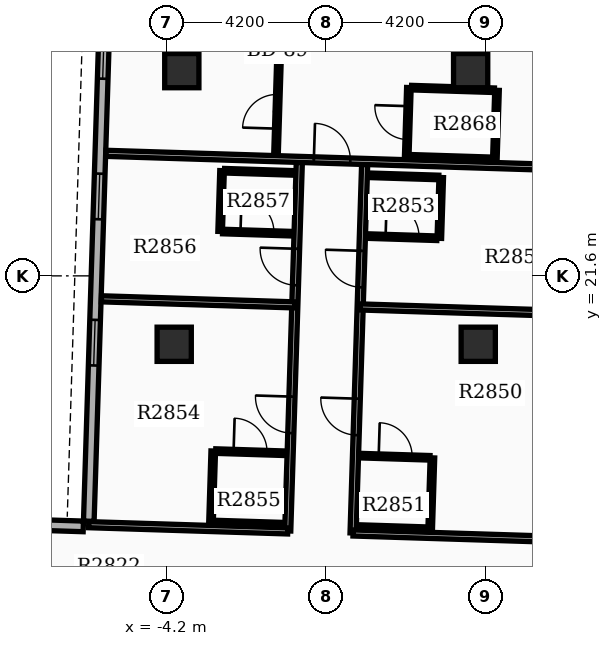
"""IFC4 building model, lengths in metres.
Left out: names, types, materials, properties, quantities, classifications, styles, units other than length and angle.
Written with IfcOpenShell. Run it as: python <this file> out.ifc"""

import sys

from ifc_helpers import new_model, si_unit, direction, frame, frame_2d, origin, origin_2d, place, context, subcontext, project, spatial, rectangle, extrude, element, fill, save


model = new_model("IFC4")
c1 = context("Model", 3, precision=1e-05, world=origin(), true_north=direction((0.0, 1.0)))
c2 = subcontext(c1, "Body", "Model", "MODEL_VIEW")
j1 = project(units=[si_unit("LENGTHUNIT", "METRE"), si_unit("PLANEANGLEUNIT", "RADIAN")], contexts=[c1])
p1 = place(None, origin())
s1 = spatial("IfcSite", under=j1, at=p1, CompositionType="ELEMENT")
p2 = place(p1, origin())
s2 = spatial("IfcBuilding", under=s1, at=p2, CompositionType="ELEMENT")
p3 = place(p2, frame((0.0, 0.0, 176.1)))
s3 = spatial("IfcBuildingStorey", under=s2, at=p3, CompositionType="ELEMENT", Elevation=176.1)
for number, where, z_axis, x_axis in (
    (1, (-4.0, 19.8, 0.0), (0.0, 0.0, 1.0), (1.0, 0.0, 0.0)),
    (2, (4.0, 19.8, 0.0), (0.0, 0.0, 1.0), (1.0, 0.0, 0.0)),
    (3, (-3.8, 27.0, 0.0), (0.0, 0.0, 1.0), (1.0, 0.0, 0.0)),
    (4, (3.8, 27.0, 0.0), (0.0, 0.0, 1.0), (1.0, 0.0, 0.0)),
):
    element("IfcColumn", number, at=place(p3, frame(where, z_axis=z_axis, x_axis=x_axis)), inside=s3, PredefinedType="COLUMN", context=c2, shape_type="SweptSolid", body=[
        extrude(rectangle(XDim=0.9, YDim=0.9, at=origin_2d()), origin(), (0.0, 0.0, 1.0), 3.9),
    ])
p4 = place(p3, frame((-5.616, 35.234, 0.0), z_axis=(0.0, 0.0, 1.0), x_axis=(-0.031398187845, -0.999506955354, 0.0)))
e5 = element("IfcWall", 5, at=p4, inside=s3, PredefinedType="STANDARD", context=c2, shape_type="SweptSolid", body=[
    extrude(rectangle(XDim=20.1, YDim=0.28, at=frame_2d((10.05, 0.0))), origin(), (0.0, 0.0, 1.0), 2.97),
])
p5 = place(p4, frame((0.85, 0.0, 0.8)))
e6 = element("IfcOpeningElement", 6, at=p5, cuts=e5, PredefinedType="OPENING", context=c2, shape_type="SweptSolid", body=[
    extrude(rectangle(XDim=1.2, YDim=1.6, at=frame_2d((0.6, 0.8))), frame((0.0, 0.15, 0.0), z_axis=(0.0, -1.0, 0.0), x_axis=(1.0, 0.0, 0.0)), (0.0, 0.0, 1.0), 0.3),
])
p6 = place(p4, frame((4.05, 0.0, 0.8)))
e7 = element("IfcOpeningElement", 7, at=p6, cuts=e5, PredefinedType="OPENING", context=c2, shape_type="SweptSolid", body=[
    extrude(rectangle(XDim=1.2, YDim=1.6, at=frame_2d((0.6, 0.8))), frame((0.0, 0.15, 0.0), z_axis=(0.0, -1.0, 0.0), x_axis=(1.0, 0.0, 0.0)), (0.0, 0.0, 1.0), 0.3),
])
p7 = place(p4, frame((7.25, 0.0, 0.8)))
e8 = element("IfcOpeningElement", 8, at=p7, cuts=e5, PredefinedType="OPENING", context=c2, shape_type="SweptSolid", body=[
    extrude(rectangle(XDim=1.2, YDim=1.6, at=frame_2d((0.6, 0.8))), frame((0.0, 0.15, 0.0), z_axis=(0.0, -1.0, 0.0), x_axis=(1.0, 0.0, 0.0)), (0.0, 0.0, 1.0), 0.3),
])
p8 = place(p4, frame((10.95, 0.0, 0.8)))
e9 = element("IfcOpeningElement", 9, at=p8, cuts=e5, PredefinedType="OPENING", context=c2, shape_type="SweptSolid", body=[
    extrude(rectangle(XDim=1.2, YDim=1.6, at=frame_2d((0.6, 0.8))), frame((0.0, 0.15, 0.0), z_axis=(0.0, -1.0, 0.0), x_axis=(1.0, 0.0, 0.0)), (0.0, 0.0, 1.0), 0.3),
])
p9 = place(p4, frame((14.799, 0.0, 0.85)))
e10 = element("IfcOpeningElement", 10, at=p9, cuts=e5, PredefinedType="OPENING", context=c2, shape_type="SweptSolid", body=[
    extrude(rectangle(XDim=1.2, YDim=1.6, at=frame_2d((0.6, 0.8))), frame((0.0, 0.15, 0.0), z_axis=(0.0, -1.0, 0.0), x_axis=(1.0, 0.0, 0.0)), (0.0, 0.0, 1.0), 0.3),
])
p10 = place(p3, frame((-12.689, 15.206, 0.0), z_axis=(0.0, 0.0, 1.0), x_axis=(0.999507262922, -0.031388395416, 0.0)))
e11 = element("IfcWall", 11, at=p10, inside=s3, PredefinedType="STANDARD", context=c2, shape_type="SweptSolid", body=[
    extrude(rectangle(XDim=6.3, YDim=0.28, at=frame_2d((3.15, 0.0))), origin(), (0.0, 0.0, 1.0), 2.97),
])
p11 = place(p3, frame((0.706, 14.835, 0.0), z_axis=(0.0, 0.0, 1.0), x_axis=(0.031411552371, 0.999506535435, 0.0)))
e12 = element("IfcWall", 12, at=p11, inside=s3, PredefinedType="PARTITIONING", context=c2, shape_type="SweptSolid", body=[
    extrude(rectangle(XDim=9.7, YDim=0.16, at=frame_2d((4.85, 0.0))), origin(), (0.0, 0.0, 1.0), 2.96),
])
p12 = place(p11, frame((2.575, 0.0, 0.0)))
e13 = element("IfcOpeningElement", 13, at=p12, cuts=e12, PredefinedType="OPENING", context=c2, shape_type="SweptSolid", body=[
    extrude(rectangle(XDim=0.96, YDim=2.15, at=frame_2d((0.48, 1.075))), frame((0.0, 0.09, 0.0), z_axis=(0.0, -1.0, 0.0), x_axis=(1.0, 0.0, 0.0)), (0.0, 0.0, 1.0), 0.18),
])
p13 = place(p11, frame((6.467, 0.0, 0.0)))
e14 = element("IfcOpeningElement", 14, at=p13, cuts=e12, PredefinedType="OPENING", context=c2, shape_type="SweptSolid", body=[
    extrude(rectangle(XDim=0.96, YDim=2.15, at=frame_2d((0.48, 1.075))), frame((0.0, 0.09, 0.0), z_axis=(0.0, -1.0, 0.0), x_axis=(1.0, 0.0, 0.0)), (0.0, 0.0, 1.0), 0.18),
])
p14 = place(p3, frame((0.706, 14.835, 0.0), z_axis=(0.0, 0.0, 1.0), x_axis=(0.999506214218, -0.031421771746, 0.0)))
e15 = element("IfcWall", 15, at=p14, inside=s3, PredefinedType="PARTITIONING", context=c2, shape_type="SweptSolid", body=[
    extrude(rectangle(XDim=6.48, YDim=0.16, at=frame_2d((3.24, 0.0))), origin(), (0.0, 0.0, 1.0), 2.96),
])
p15 = place(p3, frame((0.893, 20.782, 0.0), z_axis=(0.0, 0.0, 1.0), x_axis=(0.999506152458, -0.031423736229, 0.0)))
e16 = element("IfcWall", 16, at=p15, inside=s3, PredefinedType="PARTITIONING", context=c2, shape_type="SweptSolid", body=[
    extrude(rectangle(XDim=6.332, YDim=0.16, at=frame_2d((3.166, 0.0))), origin(), (0.0, 0.0, 1.0), 2.96),
])
p16 = place(p3, frame((0.91, 16.87, 0.0), z_axis=(0.0, 0.0, 1.0), x_axis=(0.999507221803, -0.031389704724, 0.0)))
e17 = element("IfcWall", 17, at=p16, inside=s3, PredefinedType="PARTITIONING", context=c2, shape_type="SweptSolid", body=[
    extrude(rectangle(XDim=1.82, YDim=0.12, at=frame_2d((0.91, 0.0))), origin(), (0.0, 0.0, 1.0), 2.96),
])
p17 = place(p16, frame((0.47, 0.0, 0.0)))
e18 = element("IfcOpeningElement", 18, at=p17, cuts=e17, PredefinedType="OPENING", context=c2, shape_type="SweptSolid", body=[
    extrude(rectangle(XDim=0.88, YDim=2.1, at=frame_2d((0.44, 1.05))), frame((0.0, 0.07, 0.0), z_axis=(0.0, -1.0, 0.0), x_axis=(1.0, 0.0, 0.0)), (0.0, 0.0, 1.0), 0.14),
])
p18 = place(p3, frame((0.851, 14.991, 0.0), z_axis=(0.0, 0.0, 1.0), x_axis=(0.999507221803, -0.031389704724, 0.0)))
e19 = element("IfcWall", 19, at=p18, inside=s3, PredefinedType="PARTITIONING", context=c2, shape_type="SweptSolid", body=[
    extrude(rectangle(XDim=1.82, YDim=0.12, at=frame_2d((0.91, 0.0))), origin(), (0.0, 0.0, 1.0), 2.96),
])
p19 = place(p3, frame((2.735, 14.931, 0.0), z_axis=(0.0, 0.0, 1.0), x_axis=(0.031425292588, 0.999506103526, 0.0)))
e20 = element("IfcWall", 20, at=p19, inside=s3, PredefinedType="PARTITIONING", context=c2, shape_type="SweptSolid", body=[
    extrude(rectangle(XDim=1.88, YDim=0.12, at=frame_2d((0.94, 0.0))), origin(), (0.0, 0.0, 1.0), 2.96),
])
p20 = place(p3, frame((1.092, 22.647, 0.0), z_axis=(0.0, 0.0, 1.0), x_axis=(0.999503004171, -0.03152371574, 0.0)))
e21 = element("IfcWall", 21, at=p20, inside=s3, PredefinedType="PARTITIONING", context=c2, shape_type="SweptSolid", body=[
    extrude(rectangle(XDim=1.82, YDim=0.12, at=frame_2d((0.91, 0.0))), origin(), (0.0, 0.0, 1.0), 2.96),
])
p21 = place(p20, frame((0.47, 0.0, 0.0)))
e22 = element("IfcOpeningElement", 22, at=p21, cuts=e21, PredefinedType="OPENING", context=c2, shape_type="SweptSolid", body=[
    extrude(rectangle(XDim=0.88, YDim=2.1, at=frame_2d((0.44, 1.05))), frame((0.0, 0.07, 0.0), z_axis=(0.0, -1.0, 0.0), x_axis=(1.0, 0.0, 0.0)), (0.0, 0.0, 1.0), 0.14),
])
p22 = place(p3, frame((1.142, 24.246, 0.0), z_axis=(0.0, 0.0, 1.0), x_axis=(0.999507221803, -0.031389704724, 0.0)))
e23 = element("IfcWall", 23, at=p22, inside=s3, PredefinedType="PARTITIONING", context=c2, shape_type="SweptSolid", body=[
    extrude(rectangle(XDim=1.82, YDim=0.12, at=frame_2d((0.91, 0.0))), origin(), (0.0, 0.0, 1.0), 2.96),
])
p23 = place(p3, frame((2.976, 22.588, 0.0), z_axis=(0.0, 0.0, 1.0), x_axis=(0.031277621856, 0.999510735496, 0.0)))
e24 = element("IfcWall", 24, at=p23, inside=s3, PredefinedType="PARTITIONING", context=c2, shape_type="SweptSolid", body=[
    extrude(rectangle(XDim=1.6, YDim=0.12, at=frame_2d((0.8, 0.0))), origin(), (0.0, 0.0, 1.0), 2.96),
])
p24 = place(p3, frame((-1.013, 14.889, 0.0), z_axis=(0.0, 0.0, 1.0), x_axis=(0.031410762168, 0.999506560269, 0.0)))
e25 = element("IfcWall", 25, at=p24, inside=s3, PredefinedType="PARTITIONING", context=c2, shape_type="SweptSolid", body=[
    extrude(rectangle(XDim=9.7, YDim=0.16, at=frame_2d((4.85, 0.0))), origin(), (0.0, 0.0, 1.0), 2.96),
])
p25 = place(p24, frame((2.575, 0.0, 0.0)))
e26 = element("IfcOpeningElement", 26, at=p25, cuts=e25, PredefinedType="OPENING", context=c2, shape_type="SweptSolid", body=[
    extrude(rectangle(XDim=0.96, YDim=2.15, at=frame_2d((0.48, 1.075))), frame((0.0, 0.09, 0.0), z_axis=(0.0, -1.0, 0.0), x_axis=(1.0, 0.0, 0.0)), (0.0, 0.0, 1.0), 0.18),
])
p26 = place(p24, frame((6.467, 0.0, 0.0)))
e27 = element("IfcOpeningElement", 27, at=p26, cuts=e25, PredefinedType="OPENING", context=c2, shape_type="SweptSolid", body=[
    extrude(rectangle(XDim=0.96, YDim=2.15, at=frame_2d((0.48, 1.075))), frame((0.0, 0.09, 0.0), z_axis=(0.0, -1.0, 0.0), x_axis=(1.0, 0.0, 0.0)), (0.0, 0.0, 1.0), 0.18),
])
p27 = place(p3, frame((-1.013, 14.889, 0.0), z_axis=(0.0, 0.0, 1.0), x_axis=(-0.999506834859, 0.031402023339, 0.0)))
e28 = element("IfcWall", 28, at=p27, inside=s3, PredefinedType="PARTITIONING", context=c2, shape_type="SweptSolid", body=[
    extrude(rectangle(XDim=5.24, YDim=0.16, at=frame_2d((2.62, 0.0))), origin(), (0.0, 0.0, 1.0), 2.96),
])
p28 = place(p3, frame((-0.826, 20.836, 0.0), z_axis=(0.0, 0.0, 1.0), x_axis=(-0.999506728859, 0.031405397074, 0.0)))
e29 = element("IfcWall", 29, at=p28, inside=s3, PredefinedType="PARTITIONING", context=c2, shape_type="SweptSolid", body=[
    extrude(rectangle(XDim=5.092, YDim=0.16, at=frame_2d((2.546, 0.0))), origin(), (0.0, 0.0, 1.0), 2.96),
])
p29 = place(p3, frame((-2.908, 16.99, 0.0), z_axis=(0.0, 0.0, 1.0), x_axis=(0.999507221803, -0.031389704724, 0.0)))
e30 = element("IfcWall", 30, at=p29, inside=s3, PredefinedType="PARTITIONING", context=c2, shape_type="SweptSolid", body=[
    extrude(rectangle(XDim=1.82, YDim=0.12, at=frame_2d((0.91, 0.0))), origin(), (0.0, 0.0, 1.0), 2.96),
])
p30 = place(p29, frame((0.47, 0.0, 0.0)))
e31 = element("IfcOpeningElement", 31, at=p30, cuts=e30, PredefinedType="OPENING", context=c2, shape_type="SweptSolid", body=[
    extrude(rectangle(XDim=0.88, YDim=2.1, at=frame_2d((0.44, 1.05))), frame((0.0, 0.07, 0.0), z_axis=(0.0, -1.0, 0.0), x_axis=(1.0, 0.0, 0.0)), (0.0, 0.0, 1.0), 0.14),
])
p31 = place(p3, frame((-2.967, 15.111, 0.0), z_axis=(0.0, 0.0, 1.0), x_axis=(0.999507221803, -0.031389704724, 0.0)))
e32 = element("IfcWall", 32, at=p31, inside=s3, PredefinedType="PARTITIONING", context=c2, shape_type="SweptSolid", body=[
    extrude(rectangle(XDim=1.82, YDim=0.12, at=frame_2d((0.91, 0.0))), origin(), (0.0, 0.0, 1.0), 2.96),
])
p32 = place(p3, frame((-3.032, 15.113, 0.0), z_axis=(0.0, 0.0, 1.0), x_axis=(0.031429371883, 0.999505975261, 0.0)))
e33 = element("IfcWall", 33, at=p32, inside=s3, PredefinedType="PARTITIONING", context=c2, shape_type="SweptSolid", body=[
    extrude(rectangle(XDim=1.88, YDim=0.12, at=frame_2d((0.94, 0.0))), origin(), (0.0, 0.0, 1.0), 2.96),
])
p33 = place(p3, frame((-2.726, 22.767, 0.0), z_axis=(0.0, 0.0, 1.0), x_axis=(0.999507353951, -0.031385496622, 0.0)))
e34 = element("IfcWall", 34, at=p33, inside=s3, PredefinedType="PARTITIONING", context=c2, shape_type="SweptSolid", body=[
    extrude(rectangle(XDim=1.82, YDim=0.12, at=frame_2d((0.91, 0.0))), origin(), (0.0, 0.0, 1.0), 2.96),
])
p34 = place(p33, frame((0.47, 0.0, 0.0)))
e35 = element("IfcOpeningElement", 35, at=p34, cuts=e34, PredefinedType="OPENING", context=c2, shape_type="SweptSolid", body=[
    extrude(rectangle(XDim=0.88, YDim=2.1, at=frame_2d((0.44, 1.05))), frame((0.0, 0.07, 0.0), z_axis=(0.0, -1.0, 0.0), x_axis=(1.0, 0.0, 0.0)), (0.0, 0.0, 1.0), 0.14),
])
p35 = place(p3, frame((-2.676, 24.366, 0.0), z_axis=(0.0, 0.0, 1.0), x_axis=(0.999503004171, -0.03152371574, 0.0)))
e36 = element("IfcWall", 36, at=p35, inside=s3, PredefinedType="PARTITIONING", context=c2, shape_type="SweptSolid", body=[
    extrude(rectangle(XDim=1.82, YDim=0.12, at=frame_2d((0.91, 0.0))), origin(), (0.0, 0.0, 1.0), 2.96),
])
p36 = place(p3, frame((-2.791, 22.769, 0.0), z_axis=(0.0, 0.0, 1.0), x_axis=(0.031430045267, 0.999505954087, 0.0)))
e37 = element("IfcWall", 37, at=p36, inside=s3, PredefinedType="PARTITIONING", context=c2, shape_type="SweptSolid", body=[
    extrude(rectangle(XDim=1.6, YDim=0.12, at=frame_2d((0.8, 0.0))), origin(), (0.0, 0.0, 1.0), 2.96),
])
p37 = place(p3, frame((-5.795, 24.824, 0.0), z_axis=(0.0, 0.0, 1.0), x_axis=(0.999507189267, -0.031390740738, 0.0)))
e38 = element("IfcWall", 38, at=p37, inside=s3, PredefinedType="PARTITIONING", context=c2, shape_type="SweptSolid", body=[
    extrude(rectangle(XDim=13.144, YDim=0.16, at=frame_2d((6.572, 0.0))), origin(), (0.0, 0.0, 1.0), 2.96),
])
p38 = place(p37, frame((5.472, 0.0, 0.0)))
e39 = element("IfcOpeningElement", 39, at=p38, cuts=e38, PredefinedType="OPENING", context=c2, shape_type="SweptSolid", body=[
    extrude(rectangle(XDim=0.96, YDim=2.15, at=frame_2d((0.48, 1.075))), frame((0.0, 0.09, 0.0), z_axis=(0.0, -1.0, 0.0), x_axis=(1.0, 0.0, 0.0)), (0.0, 0.0, 1.0), 0.18),
])
p39 = place(p3, frame((-1.323, 24.774, 0.0), z_axis=(0.0, 0.0, 1.0), x_axis=(0.031416574993, 0.999506377576, 0.0)))
e40 = element("IfcWall", 40, at=p39, inside=s3, PredefinedType="PARTITIONING", context=c2, shape_type="SweptSolid", body=[
    extrude(rectangle(XDim=10.312, YDim=0.12, at=frame_2d((5.156, 0.0))), origin(), (0.0, 0.0, 1.0), 2.96),
])
p40 = place(p39, frame((0.7, 0.0, 0.0)))
e41 = element("IfcOpeningElement", 41, at=p40, cuts=e40, PredefinedType="OPENING", context=c2, shape_type="SweptSolid", body=[
    extrude(rectangle(XDim=0.9, YDim=2.1, at=frame_2d((0.45, 1.05))), frame((0.0, 0.07, 0.0), z_axis=(0.0, -1.0, 0.0), x_axis=(1.0, 0.0, 0.0)), (0.0, 0.0, 1.0), 0.14),
])
p41 = place(p3, frame((2.118, 24.736, 0.0), z_axis=(0.0, 0.0, 1.0), x_axis=(0.03152371574, 0.999503004171, 0.0)))
e42 = element("IfcWall", 42, at=p41, inside=s3, PredefinedType="PARTITIONING", context=c2, shape_type="SweptSolid", body=[
    extrude(rectangle(XDim=1.82, YDim=0.12, at=frame_2d((0.91, 0.0))), origin(), (0.0, 0.0, 1.0), 2.96),
])
p42 = place(p41, frame((0.45, 0.0, 0.0)))
e43 = element("IfcOpeningElement", 43, at=p42, cuts=e42, PredefinedType="OPENING", context=c2, shape_type="SweptSolid", body=[
    extrude(rectangle(XDim=0.88, YDim=2.1, at=frame_2d((0.44, 1.05))), frame((0.0, 0.07, 0.0), z_axis=(0.0, -1.0, 0.0), x_axis=(1.0, 0.0, 0.0)), (0.0, 0.0, 1.0), 0.14),
])
p43 = place(p3, frame((4.437, 24.663, 0.0), z_axis=(0.0, 0.0, 1.0), x_axis=(0.031255692016, 0.999511421504, 0.0)))
e44 = element("IfcWall", 44, at=p43, inside=s3, PredefinedType="PARTITIONING", context=c2, shape_type="SweptSolid", body=[
    extrude(rectangle(XDim=1.82, YDim=0.12, at=frame_2d((0.91, 0.0))), origin(), (0.0, 0.0, 1.0), 2.96),
])
for number, where, z_axis, x_axis in (
    (45, (2.188, 24.733, 0.0), (0.0, 0.0, 1.0), (1.0, -0.031, 0.0)),
    (46, (2.245, 26.552, 0.0), (0.0, 0.0, 1.0), (1.0, -0.031, 0.0)),
):
    element("IfcWall", number, at=place(p3, frame(where, z_axis=z_axis, x_axis=x_axis)), inside=s3, PredefinedType="PARTITIONING", context=c2, shape_type="SweptSolid", body=[
        extrude(rectangle(XDim=2.18, YDim=0.12, at=frame_2d((1.09, 0.0))), origin(), (0.0, 0.0, 1.0), 2.96),
    ])
p44 = place(p7, origin())
e47 = element("IfcWindow", 47, at=p44, inside=s3, PartitioningType="SINGLE_PANEL", PredefinedType="WINDOW", context=c2, shape_type="SweptSolid", body=[
    extrude(rectangle(XDim=1.2, YDim=1.6, at=frame_2d((0.6, 0.8))), frame((0.0, 0.03, 0.0), z_axis=(0.0, -1.0, 0.0), x_axis=(1.0, 0.0, 0.0)), (0.0, 0.0, 1.0), 0.06),
])
fill(e8, e47)
p45 = place(p8, origin())
e48 = element("IfcWindow", 48, at=p45, inside=s3, PartitioningType="SINGLE_PANEL", PredefinedType="WINDOW", context=c2, shape_type="SweptSolid", body=[
    extrude(rectangle(XDim=1.2, YDim=1.6, at=frame_2d((0.6, 0.8))), frame((0.0, 0.03, 0.0), z_axis=(0.0, -1.0, 0.0), x_axis=(1.0, 0.0, 0.0)), (0.0, 0.0, 1.0), 0.06),
])
fill(e9, e48)
p46 = place(p9, origin())
e49 = element("IfcWindow", 49, at=p46, inside=s3, PartitioningType="SINGLE_PANEL", PredefinedType="WINDOW", context=c2, shape_type="SweptSolid", body=[
    extrude(rectangle(XDim=1.2, YDim=1.6, at=frame_2d((0.6, 0.8))), frame((0.0, 0.03, 0.0), z_axis=(0.0, -1.0, 0.0), x_axis=(1.0, 0.0, 0.0)), (0.0, 0.0, 1.0), 0.06),
])
fill(e10, e49)
p47 = place(p12, origin())
e50 = element("IfcDoor", 50, at=p47, inside=s3, OperationType="SINGLE_SWING_RIGHT", PredefinedType="DOOR", context=c2, shape_type="SweptSolid", body=[
    extrude(rectangle(XDim=0.96, YDim=2.15, at=frame_2d((0.48, 1.075))), frame((0.0, 0.025, 0.0), z_axis=(0.0, -1.0, 0.0), x_axis=(1.0, 0.0, 0.0)), (0.0, 0.0, 1.0), 0.05),
])
fill(e13, e50)
p48 = place(p17, origin())
e51 = element("IfcDoor", 51, at=p48, inside=s3, OperationType="SINGLE_SWING_LEFT", PredefinedType="DOOR", context=c2, shape_type="SweptSolid", body=[
    extrude(rectangle(XDim=0.88, YDim=2.1, at=frame_2d((0.44, 1.05))), frame((0.0, 0.025, 0.0), z_axis=(0.0, -1.0, 0.0), x_axis=(1.0, 0.0, 0.0)), (0.0, 0.0, 1.0), 0.05),
])
fill(e18, e51)
p49 = place(p13, origin())
e52 = element("IfcDoor", 52, at=p49, inside=s3, OperationType="SINGLE_SWING_RIGHT", PredefinedType="DOOR", context=c2, shape_type="SweptSolid", body=[
    extrude(rectangle(XDim=0.96, YDim=2.15, at=frame_2d((0.48, 1.075))), frame((0.0, 0.025, 0.0), z_axis=(0.0, -1.0, 0.0), x_axis=(1.0, 0.0, 0.0)), (0.0, 0.0, 1.0), 0.05),
])
fill(e14, e52)
p50 = place(p21, origin())
e53 = element("IfcDoor", 53, at=p50, inside=s3, OperationType="SINGLE_SWING_LEFT", PredefinedType="DOOR", context=c2, shape_type="SweptSolid", body=[
    extrude(rectangle(XDim=0.88, YDim=2.1, at=frame_2d((0.44, 1.05))), frame((0.0, 0.025, 0.0), z_axis=(0.0, -1.0, 0.0), x_axis=(1.0, 0.0, 0.0)), (0.0, 0.0, 1.0), 0.05),
])
fill(e22, e53)
p51 = place(p25, origin())
e54 = element("IfcDoor", 54, at=p51, inside=s3, OperationType="SINGLE_SWING_RIGHT", PredefinedType="DOOR", context=c2, shape_type="SweptSolid", body=[
    extrude(rectangle(XDim=0.96, YDim=2.15, at=frame_2d((0.48, 1.075))), frame((0.0, 0.025, 0.0), z_axis=(0.0, -1.0, 0.0), x_axis=(1.0, 0.0, 0.0)), (0.0, 0.0, 1.0), 0.05),
])
fill(e26, e54)
p52 = place(p30, origin())
e55 = element("IfcDoor", 55, at=p52, inside=s3, OperationType="SINGLE_SWING_LEFT", PredefinedType="DOOR", context=c2, shape_type="SweptSolid", body=[
    extrude(rectangle(XDim=0.88, YDim=2.1, at=frame_2d((0.44, 1.05))), frame((0.0, 0.025, 0.0), z_axis=(0.0, -1.0, 0.0), x_axis=(1.0, 0.0, 0.0)), (0.0, 0.0, 1.0), 0.05),
])
fill(e31, e55)
p53 = place(p26, origin())
e56 = element("IfcDoor", 56, at=p53, inside=s3, OperationType="SINGLE_SWING_RIGHT", PredefinedType="DOOR", context=c2, shape_type="SweptSolid", body=[
    extrude(rectangle(XDim=0.96, YDim=2.15, at=frame_2d((0.48, 1.075))), frame((0.0, 0.025, 0.0), z_axis=(0.0, -1.0, 0.0), x_axis=(1.0, 0.0, 0.0)), (0.0, 0.0, 1.0), 0.05),
])
fill(e27, e56)
p54 = place(p34, origin())
e57 = element("IfcDoor", 57, at=p54, inside=s3, OperationType="SINGLE_SWING_LEFT", PredefinedType="DOOR", context=c2, shape_type="SweptSolid", body=[
    extrude(rectangle(XDim=0.88, YDim=2.1, at=frame_2d((0.44, 1.05))), frame((0.0, 0.025, 0.0), z_axis=(0.0, -1.0, 0.0), x_axis=(1.0, 0.0, 0.0)), (0.0, 0.0, 1.0), 0.05),
])
fill(e35, e57)
p55 = place(p38, origin())
e58 = element("IfcDoor", 58, at=p55, inside=s3, OperationType="SINGLE_SWING_LEFT", PredefinedType="DOOR", context=c2, shape_type="SweptSolid", body=[
    extrude(rectangle(XDim=0.96, YDim=2.15, at=frame_2d((0.48, 1.075))), frame((0.0, 0.025, 0.0), z_axis=(0.0, -1.0, 0.0), x_axis=(1.0, 0.0, 0.0)), (0.0, 0.0, 1.0), 0.05),
])
fill(e39, e58)
p56 = place(p40, origin())
e59 = element("IfcDoor", 59, at=p56, inside=s3, OperationType="SINGLE_SWING_LEFT", PredefinedType="DOOR", context=c2, shape_type="SweptSolid", body=[
    extrude(rectangle(XDim=0.9, YDim=2.1, at=frame_2d((0.45, 1.05))), frame((0.0, 0.025, 0.0), z_axis=(0.0, -1.0, 0.0), x_axis=(1.0, 0.0, 0.0)), (0.0, 0.0, 1.0), 0.05),
])
fill(e41, e59)
p57 = place(p42, origin())
e60 = element("IfcDoor", 60, at=p57, inside=s3, OperationType="SINGLE_SWING_RIGHT", PredefinedType="DOOR", context=c2, shape_type="SweptSolid", body=[
    extrude(rectangle(XDim=0.88, YDim=2.1, at=frame_2d((0.44, 1.05))), frame((0.0, 0.025, 0.0), z_axis=(0.0, -1.0, 0.0), x_axis=(1.0, 0.0, 0.0)), (0.0, 0.0, 1.0), 0.05),
])
fill(e43, e60)
save(model, sys.argv[1])
